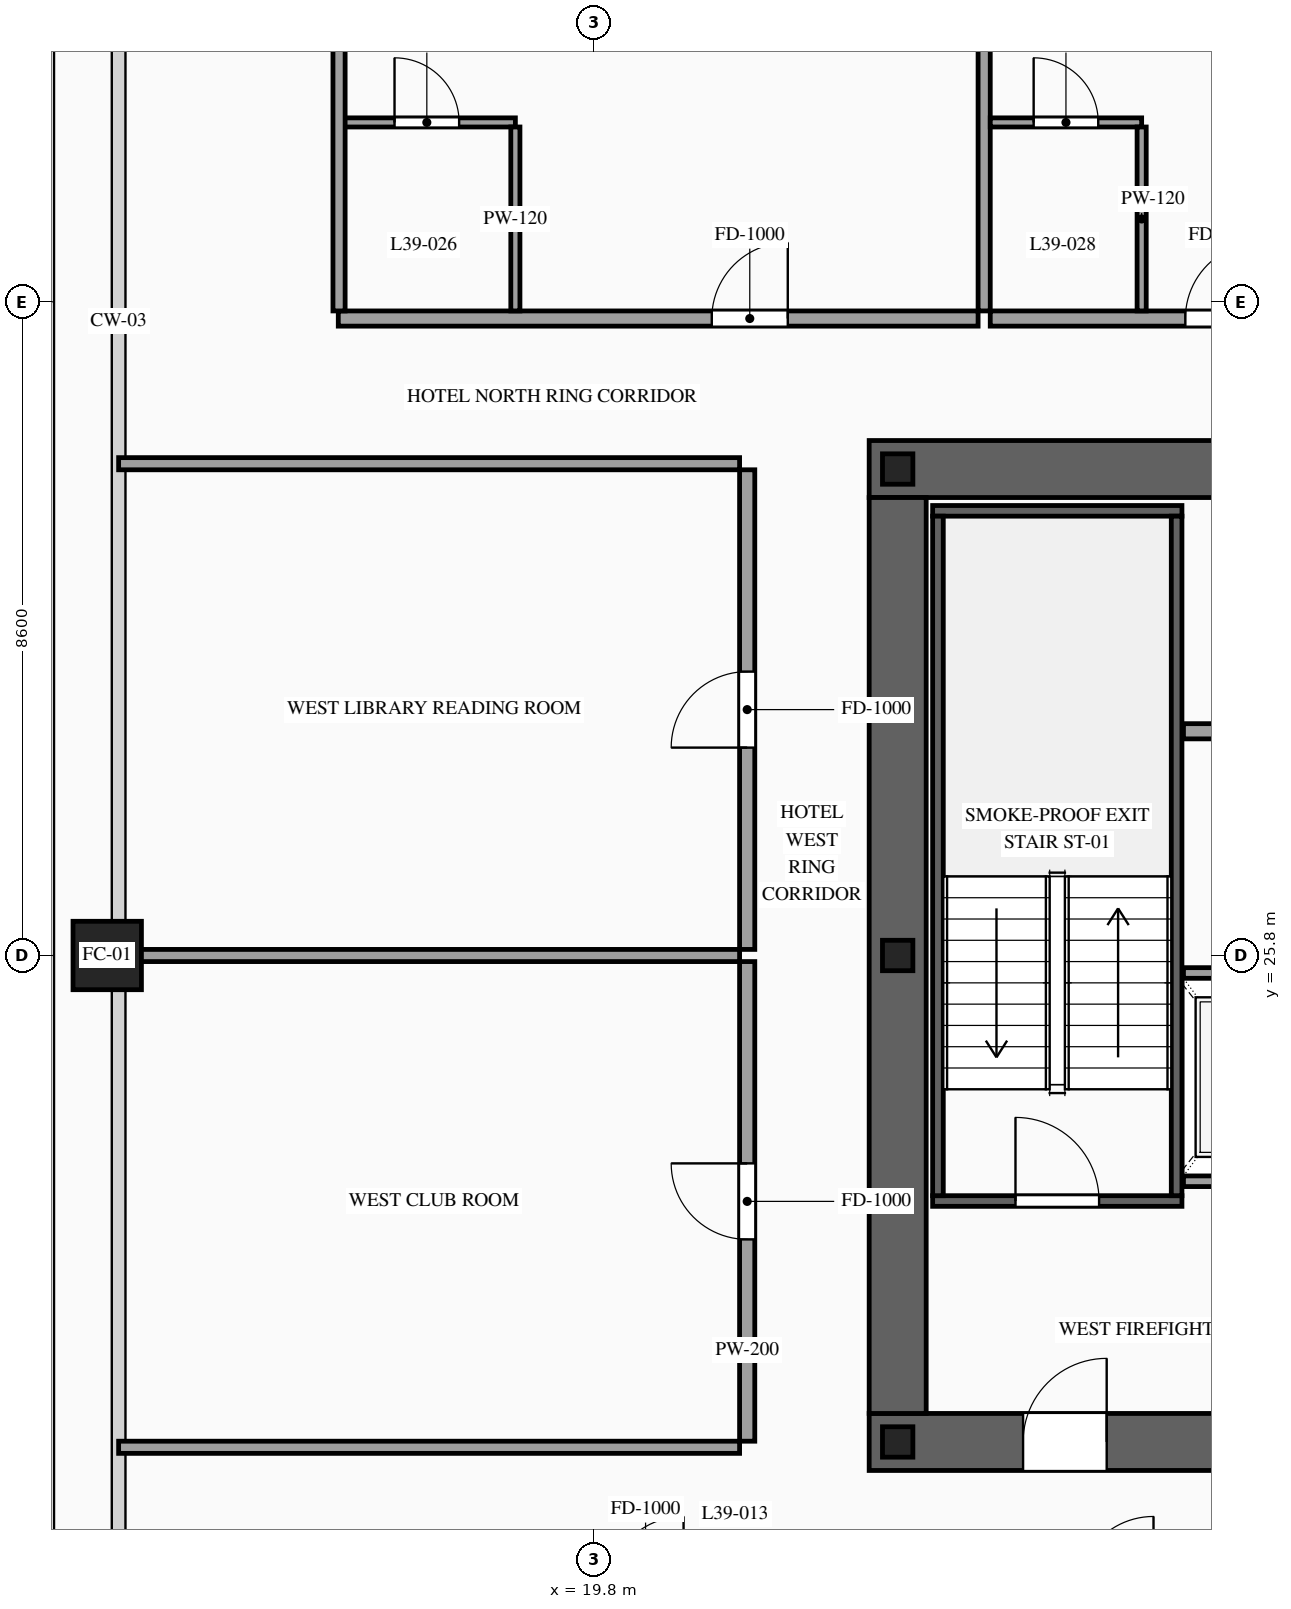
"""IFC4 building model, lengths in metres.
Left out: names, types, materials, properties, quantities, classifications, styles, units other than length and angle.
Written with IfcOpenShell. Run it as: python <this file> out.ifc"""

import sys

from ifc_helpers import new_model, si_unit, direction, frame, frame_2d, origin, origin_2d, place, context, subcontext, project, spatial, rectangle, hollow_rectangle, i_section, extrude, source, transform, mapped, element, fill, save


model = new_model("IFC4")
c1 = context("Model", 3, precision=1e-05, world=origin(), true_north=direction((0.0, 1.0)))
c2 = subcontext(c1, "Body", "Model", "MODEL_VIEW")
j1 = project(units=[si_unit("LENGTHUNIT", "METRE"), si_unit("PLANEANGLEUNIT", "RADIAN")], contexts=[c1])
p1 = place(None, origin())
s1 = spatial("IfcSite", under=j1, at=p1, CompositionType="ELEMENT")
p2 = place(p1, origin())
s2 = spatial("IfcBuilding", under=s1, at=p2, CompositionType="ELEMENT")
p3 = place(p2, frame((0.0, 0.0, 148.8)))
s3 = spatial("IfcBuildingStorey", under=s2, at=p3, CompositionType="ELEMENT", Elevation=148.8)
p4 = place(p3, frame((23.425, 19.4, 0.0), z_axis=(0.0, 0.0, 1.0), x_axis=(1.0, 0.0, 0.0)))
e1 = element("IfcWall", 1, at=p4, inside=s3, PredefinedType="SHEAR", context=c2, shape_type="SweptSolid", body=[
    extrude(rectangle(XDim=27.15, YDim=0.75, at=frame_2d((13.575, 0.0))), origin(), (0.0, 0.0, 1.0), 3.6),
])
p5 = place(p4, frame((2.025, 0.0, 0.0)))
e2 = element("IfcOpeningElement", 2, at=p5, cuts=e1, PredefinedType="OPENING", context=c2, shape_type="SweptSolid", body=[
    extrude(rectangle(XDim=1.1, YDim=2.2, at=frame_2d((0.55, 1.1))), frame((0.0, 0.39, 0.0), z_axis=(0.0, -1.0, 0.0), x_axis=(1.0, 0.0, 0.0)), (0.0, 0.0, 1.0), 0.78),
])
p6 = place(p4, frame((9.925, 0.0, 0.0)))
e3 = element("IfcOpeningElement", 3, at=p6, cuts=e1, PredefinedType="OPENING", context=c2, shape_type="SweptSolid", body=[
    extrude(rectangle(XDim=1.1, YDim=2.2, at=frame_2d((0.55, 1.1))), frame((0.0, 0.39, 0.0), z_axis=(0.0, -1.0, 0.0), x_axis=(1.0, 0.0, 0.0)), (0.0, 0.0, 1.0), 0.78),
])
p7 = place(p4, frame((23.125, 0.0, 0.0)))
e4 = element("IfcOpeningElement", 4, at=p7, cuts=e1, PredefinedType="OPENING", context=c2, shape_type="SweptSolid", body=[
    extrude(rectangle(XDim=1.1, YDim=2.2, at=frame_2d((0.55, 1.1))), frame((0.0, 0.39, 0.0), z_axis=(0.0, -1.0, 0.0), x_axis=(1.0, 0.0, 0.0)), (0.0, 0.0, 1.0), 0.78),
])
p8 = place(p4, frame((19.745, 0.0, 0.0)))
e5 = element("IfcOpeningElement", 5, at=p8, cuts=e1, PredefinedType="OPENING", context=c2, shape_type="SweptSolid", body=[
    extrude(rectangle(XDim=0.9, YDim=2.15, at=frame_2d((0.45, 1.075))), frame((0.0, 0.39, 0.0), z_axis=(0.0, -1.0, 0.0), x_axis=(1.0, 0.0, 0.0)), (0.0, 0.0, 1.0), 0.78),
])
p9 = place(p4, frame((18.305, 0.0, 0.0)))
e6 = element("IfcOpeningElement", 6, at=p9, cuts=e1, PredefinedType="OPENING", context=c2, shape_type="SweptSolid", body=[
    extrude(rectangle(XDim=0.9, YDim=2.15, at=frame_2d((0.45, 1.075))), frame((0.0, 0.39, 0.0), z_axis=(0.0, -1.0, 0.0), x_axis=(1.0, 0.0, 0.0)), (0.0, 0.0, 1.0), 0.78),
])
p10 = place(p3, frame((23.425, 32.2, 0.0), z_axis=(0.0, 0.0, 1.0), x_axis=(1.0, 0.0, 0.0)))
e7 = element("IfcWall", 7, at=p10, inside=s3, PredefinedType="SHEAR", context=c2, shape_type="SweptSolid", body=[
    extrude(rectangle(XDim=27.15, YDim=0.75, at=frame_2d((13.575, 0.0))), origin(), (0.0, 0.0, 1.0), 3.6),
])
p11 = place(p10, frame((4.645, 0.0, 0.0)))
e8 = element("IfcOpeningElement", 8, at=p11, cuts=e7, PredefinedType="OPENING", context=c2, shape_type="SweptSolid", body=[
    extrude(rectangle(XDim=0.9, YDim=2.15, at=frame_2d((0.45, 1.075))), frame((0.0, 0.39, 0.0), z_axis=(0.0, -1.0, 0.0), x_axis=(1.0, 0.0, 0.0)), (0.0, 0.0, 1.0), 0.78),
])
p12 = place(p10, frame((9.925, 0.0, 0.0)))
e9 = element("IfcOpeningElement", 9, at=p12, cuts=e7, PredefinedType="OPENING", context=c2, shape_type="SweptSolid", body=[
    extrude(rectangle(XDim=1.1, YDim=2.2, at=frame_2d((0.55, 1.1))), frame((0.0, 0.39, 0.0), z_axis=(0.0, -1.0, 0.0), x_axis=(1.0, 0.0, 0.0)), (0.0, 0.0, 1.0), 0.78),
])
p13 = place(p10, frame((15.775, 0.0, 0.0)))
e10 = element("IfcOpeningElement", 10, at=p13, cuts=e7, PredefinedType="OPENING", context=c2, shape_type="SweptSolid", body=[
    extrude(rectangle(XDim=1.1, YDim=2.2, at=frame_2d((0.55, 1.1))), frame((0.0, 0.39, 0.0), z_axis=(0.0, -1.0, 0.0), x_axis=(1.0, 0.0, 0.0)), (0.0, 0.0, 1.0), 0.78),
])
p14 = place(p10, frame((19.745, 0.0, 0.0)))
e11 = element("IfcOpeningElement", 11, at=p14, cuts=e7, PredefinedType="OPENING", context=c2, shape_type="SweptSolid", body=[
    extrude(rectangle(XDim=0.9, YDim=2.15, at=frame_2d((0.45, 1.075))), frame((0.0, 0.39, 0.0), z_axis=(0.0, -1.0, 0.0), x_axis=(1.0, 0.0, 0.0)), (0.0, 0.0, 1.0), 0.78),
])
m1 = source(origin(), c2, "Body", "SweptSolid", [
    extrude(rectangle(XDim=12.05, YDim=0.75, at=frame_2d((6.025, 0.0))), origin(), (0.0, 0.0, 1.0), 3.6),
])
p15 = place(p3, frame((23.8, 19.775, 0.0), z_axis=(0.0, 0.0, 1.0), x_axis=(0.0, 1.0, 0.0)))
e12 = element("IfcWall", 12, at=p15, inside=s3, PredefinedType="SHEAR", context=c2, shape_type="MappedRepresentation", body=[
    mapped(m1, transform((0.0, 0.0, 0.0), scale=1.0)),
])
m2 = source(origin(), c2, "Body", "SweptSolid", [
    extrude(i_section(OverallWidth=0.4, OverallDepth=0.4, WebThickness=0.013, FlangeThickness=0.021, at=origin_2d()), origin(), (0.0, 0.0, 1.0), 3.6),
])
for number, where, z_axis, x_axis in (
    (13, (23.8, 19.4, 0.0), (0.0, 0.0, 1.0), (1.0, 0.0, 0.0)),
    (14, (23.8, 25.8, 0.0), (0.0, 0.0, 1.0), (1.0, 0.0, 0.0)),
    (15, (23.8, 32.2, 0.0), (0.0, 0.0, 1.0), (1.0, 0.0, 0.0)),
):
    element("IfcColumn", number, at=place(p3, frame(where, z_axis=z_axis, x_axis=x_axis)), inside=s3, PredefinedType="COLUMN", context=c2, shape_type="MappedRepresentation", body=[
        mapped(m2, transform((0.0, 0.0, 0.0), scale=1.0)),
    ])
m3 = source(origin(), c2, "Body", "SweptSolid", [
    extrude(hollow_rectangle(XDim=0.9, YDim=0.9, WallThickness=0.042, at=origin_2d()), origin(), (0.0, 0.0, 1.0), 3.6),
])
p16 = place(p3, frame((13.4, 25.8, 0.0), z_axis=(0.0, 0.0, 1.0), x_axis=(1.0, 0.0, 0.0)))
e16 = element("IfcColumn", 16, at=p16, inside=s3, PredefinedType="COLUMN", context=c2, shape_type="MappedRepresentation", body=[
    mapped(m3, transform((0.0, 0.0, 0.0), scale=1.0)),
])
p17 = place(p3, frame((27.56, 22.83, 0.0), z_axis=(0.0, 0.0, 1.0), x_axis=(1.0, 0.0, 0.0)))
e17 = element("IfcWall", 17, at=p17, inside=s3, PredefinedType="SOLIDWALL", context=c2, shape_type="SweptSolid", body=[
    extrude(rectangle(XDim=1.92, YDim=0.14, at=frame_2d((0.96, 0.0))), origin(), (0.0, 0.0, 1.0), 3.38),
])
p18 = place(p17, frame((0.41, 0.0, 0.0)))
e18 = element("IfcOpeningElement", 18, at=p18, cuts=e17, PredefinedType="OPENING", context=c2, shape_type="SweptSolid", body=[
    extrude(rectangle(XDim=1.1, YDim=2.2, at=frame_2d((0.55, 1.1))), frame((0.0, 0.085, 0.0), z_axis=(0.0, -1.0, 0.0), x_axis=(1.0, 0.0, 0.0)), (0.0, 0.0, 1.0), 0.17),
])
m4 = source(origin(), c2, "Body", "SweptSolid", [
    extrude(rectangle(XDim=1.92, YDim=0.14, at=frame_2d((0.96, 0.0))), origin(), (0.0, 0.0, 1.0), 3.38),
])
p19 = place(p3, frame((27.56, 25.57, 0.0), z_axis=(0.0, 0.0, 1.0), x_axis=(1.0, 0.0, 0.0)))
e19 = element("IfcWall", 19, at=p19, inside=s3, PredefinedType="SOLIDWALL", context=c2, shape_type="MappedRepresentation", body=[
    mapped(m4, transform((0.0, 0.0, 0.0), scale=1.0)),
])
p20 = place(p3, frame((24.26, 22.57, 0.0), z_axis=(0.0, 0.0, 1.0), x_axis=(1.0, 0.0, 0.0)))
e20 = element("IfcWall", 20, at=p20, inside=s3, PredefinedType="SOLIDWALL", context=c2, shape_type="SweptSolid", body=[
    extrude(rectangle(XDim=3.28, YDim=0.14, at=frame_2d((1.64, 0.0))), origin(), (0.0, 0.0, 1.0), 3.38),
])
p21 = place(p20, frame((1.09, 0.0, 0.0)))
e21 = element("IfcOpeningElement", 21, at=p21, cuts=e20, PredefinedType="OPENING", context=c2, shape_type="SweptSolid", body=[
    extrude(rectangle(XDim=1.1, YDim=2.2, at=frame_2d((0.55, 1.1))), frame((0.0, 0.085, 0.0), z_axis=(0.0, -1.0, 0.0), x_axis=(1.0, 0.0, 0.0)), (0.0, 0.0, 1.0), 0.17),
])
m5 = source(origin(), c2, "Body", "SweptSolid", [
    extrude(rectangle(XDim=3.28, YDim=0.14, at=frame_2d((1.64, 0.0))), origin(), (0.0, 0.0, 1.0), 3.38),
])
p22 = place(p3, frame((24.26, 31.65, 0.0), z_axis=(0.0, 0.0, 1.0), x_axis=(1.0, 0.0, 0.0)))
e22 = element("IfcWall", 22, at=p22, inside=s3, PredefinedType="SOLIDWALL", context=c2, shape_type="MappedRepresentation", body=[
    mapped(m5, transform((0.0, 0.0, 0.0), scale=1.0)),
])
m6 = source(origin(), c2, "Body", "SweptSolid", [
    extrude(rectangle(XDim=8.94, YDim=0.14, at=frame_2d((4.47, 0.0))), origin(), (0.0, 0.0, 1.0), 3.38),
])
for number, where, z_axis, x_axis in (
    (23, (24.33, 22.64, 0.0), (0.0, 0.0, 1.0), (0.0, 1.0, 0.0)),
    (24, (27.47, 22.64, 0.0), (0.0, 0.0, 1.0), (0.0, 1.0, 0.0)),
):
    element("IfcWall", number, at=place(p3, frame(where, z_axis=z_axis, x_axis=x_axis)), inside=s3, PredefinedType="SOLIDWALL", context=c2, shape_type="MappedRepresentation", body=[
        mapped(m6, transform((0.0, 0.0, 0.0), scale=1.0)),
    ])
p23 = place(p3, frame((27.56, 28.75, 0.0), z_axis=(0.0, 0.0, 1.0), x_axis=(1.0, 0.0, 0.0)))
e25 = element("IfcWall", 25, at=p23, inside=s3, PredefinedType="PARTITIONING", context=c2, shape_type="SweptSolid", body=[
    extrude(rectangle(XDim=1.92, YDim=0.2, at=frame_2d((0.96, 0.0))), origin(), (0.0, 0.0, 1.0), 3.38),
])
p24 = place(p23, frame((0.51, 0.0, 0.0)))
e26 = element("IfcOpeningElement", 26, at=p24, cuts=e25, PredefinedType="OPENING", context=c2, shape_type="SweptSolid", body=[
    extrude(rectangle(XDim=0.9, YDim=2.15, at=frame_2d((0.45, 1.075))), frame((0.0, 0.115, 0.0), z_axis=(0.0, -1.0, 0.0), x_axis=(1.0, 0.0, 0.0)), (0.0, 0.0, 1.0), 0.23),
])
p25 = place(p3, frame((16.44, 34.18, 0.0), z_axis=(0.0, 0.0, 1.0), x_axis=(1.0, 0.0, 0.0)))
e27 = element("IfcWall", 27, at=p25, inside=s3, PredefinedType="PARTITIONING", context=c2, shape_type="SweptSolid", body=[
    extrude(rectangle(XDim=8.418, YDim=0.2, at=frame_2d((4.209, 0.0))), origin(), (0.0, 0.0, 1.0), 3.38),
])
p26 = place(p25, frame((4.914, 0.0, 0.0)))
e28 = element("IfcOpeningElement", 28, at=p26, cuts=e27, PredefinedType="OPENING", context=c2, shape_type="SweptSolid", body=[
    extrude(rectangle(XDim=1.0, YDim=2.2, at=frame_2d((0.5, 1.1))), frame((0.0, 0.115, 0.0), z_axis=(0.0, -1.0, 0.0), x_axis=(1.0, 0.0, 0.0)), (0.0, 0.0, 1.0), 0.23),
])
m7 = source(origin(), c2, "Body", "SweptSolid", [
    extrude(rectangle(XDim=14.97, YDim=0.16, at=frame_2d((7.485, 0.0))), origin(), (0.0, 0.0, 1.0), 3.38),
])
p27 = place(p3, frame((24.938, 34.28, 0.0), z_axis=(0.0, 0.0, 1.0), x_axis=(0.0, 1.0, 0.0)))
e29 = element("IfcWall", 29, at=p27, inside=s3, PredefinedType="PARTITIONING", context=c2, shape_type="MappedRepresentation", body=[
    mapped(m7, transform((0.0, 0.0, 0.0), scale=1.0)),
])
p28 = place(p3, frame((16.44, 36.76, 0.0), z_axis=(0.0, 0.0, 1.0), x_axis=(1.0, 0.0, 0.0)))
e30 = element("IfcWall", 30, at=p28, inside=s3, PredefinedType="PARTITIONING", context=c2, shape_type="SweptSolid", body=[
    extrude(rectangle(XDim=2.33, YDim=0.12, at=frame_2d((1.165, 0.0))), origin(), (0.0, 0.0, 1.0), 3.38),
])
p29 = place(p28, frame((0.74, 0.0, 0.0)))
e31 = element("IfcOpeningElement", 31, at=p29, cuts=e30, PredefinedType="OPENING", context=c2, shape_type="SweptSolid", body=[
    extrude(rectangle(XDim=0.85, YDim=2.1, at=frame_2d((0.425, 1.05))), frame((0.0, 0.075, 0.0), z_axis=(0.0, -1.0, 0.0), x_axis=(1.0, 0.0, 0.0)), (0.0, 0.0, 1.0), 0.15),
])
m8 = source(origin(), c2, "Body", "SweptSolid", [
    extrude(rectangle(XDim=2.42, YDim=0.12, at=frame_2d((1.21, 0.0))), origin(), (0.0, 0.0, 1.0), 3.38),
])
p30 = place(p3, frame((18.77, 34.28, 0.0), z_axis=(0.0, 0.0, 1.0), x_axis=(0.0, 1.0, 0.0)))
e32 = element("IfcWall", 32, at=p30, inside=s3, PredefinedType="PARTITIONING", context=c2, shape_type="MappedRepresentation", body=[
    mapped(m8, transform((0.0, 0.0, 0.0), scale=1.0)),
])
p31 = place(p3, frame((25.018, 34.18, 0.0), z_axis=(0.0, 0.0, 1.0), x_axis=(1.0, 0.0, 0.0)))
e33 = element("IfcWall", 33, at=p31, inside=s3, PredefinedType="PARTITIONING", context=c2, shape_type="SweptSolid", body=[
    extrude(rectangle(XDim=4.062, YDim=0.2, at=frame_2d((2.031, 0.0))), origin(), (0.0, 0.0, 1.0), 3.38),
])
p32 = place(p31, frame((2.567, 0.0, 0.0)))
e34 = element("IfcOpeningElement", 34, at=p32, cuts=e33, PredefinedType="OPENING", context=c2, shape_type="SweptSolid", body=[
    extrude(rectangle(XDim=1.0, YDim=2.2, at=frame_2d((0.5, 1.1))), frame((0.0, 0.115, 0.0), z_axis=(0.0, -1.0, 0.0), x_axis=(1.0, 0.0, 0.0)), (0.0, 0.0, 1.0), 0.23),
])
p33 = place(p3, frame((25.018, 36.76, 0.0), z_axis=(0.0, 0.0, 1.0), x_axis=(1.0, 0.0, 0.0)))
e35 = element("IfcWall", 35, at=p33, inside=s3, PredefinedType="PARTITIONING", context=c2, shape_type="SweptSolid", body=[
    extrude(rectangle(XDim=1.992, YDim=0.12, at=frame_2d((0.996, 0.0))), origin(), (0.0, 0.0, 1.0), 3.38),
])
p34 = place(p33, frame((0.571, 0.0, 0.0)))
e36 = element("IfcOpeningElement", 36, at=p34, cuts=e35, PredefinedType="OPENING", context=c2, shape_type="SweptSolid", body=[
    extrude(rectangle(XDim=0.85, YDim=2.1, at=frame_2d((0.425, 1.05))), frame((0.0, 0.075, 0.0), z_axis=(0.0, -1.0, 0.0), x_axis=(1.0, 0.0, 0.0)), (0.0, 0.0, 1.0), 0.15),
])
p35 = place(p3, frame((27.01, 34.28, 0.0), z_axis=(0.0, 0.0, 1.0), x_axis=(0.0, 1.0, 0.0)))
e37 = element("IfcWall", 37, at=p35, inside=s3, PredefinedType="PARTITIONING", context=c2, shape_type="MappedRepresentation", body=[
    mapped(m8, transform((0.0, 0.0, 0.0), scale=1.0)),
])
m9 = source(origin(), c2, "Body", "SweptSolid", [
    extrude(rectangle(XDim=14.82, YDim=0.16, at=frame_2d((7.41, 0.0))), origin(), (0.0, 0.0, 1.0), 3.38),
])
p36 = place(p3, frame((16.45, 34.28, 0.0), z_axis=(0.0, 0.0, 1.0), x_axis=(0.0, 1.0, 0.0)))
e38 = element("IfcWall", 38, at=p36, inside=s3, PredefinedType="PARTITIONING", context=c2, shape_type="MappedRepresentation", body=[
    mapped(m9, transform((0.0, 0.0, 0.0), scale=1.0)),
])
p37 = place(p3, frame((21.82, 19.41, 0.0), z_axis=(0.0, 0.0, 1.0), x_axis=(0.0, 1.0, 0.0)))
e39 = element("IfcWall", 39, at=p37, inside=s3, PredefinedType="PARTITIONING", context=c2, shape_type="SweptSolid", body=[
    extrude(rectangle(XDim=6.31, YDim=0.2, at=frame_2d((3.155, 0.0))), origin(), (0.0, 0.0, 1.0), 3.38),
])
p38 = place(p37, frame((2.655, 0.0, 0.0)))
e40 = element("IfcOpeningElement", 40, at=p38, cuts=e39, PredefinedType="OPENING", context=c2, shape_type="SweptSolid", body=[
    extrude(rectangle(XDim=1.0, YDim=2.2, at=frame_2d((0.5, 1.1))), frame((0.0, 0.115, 0.0), z_axis=(0.0, -1.0, 0.0), x_axis=(1.0, 0.0, 0.0)), (0.0, 0.0, 1.0), 0.23),
])
m10 = source(origin(), c2, "Body", "SweptSolid", [
    extrude(rectangle(XDim=8.17, YDim=0.16, at=frame_2d((4.085, 0.0))), origin(), (0.0, 0.0, 1.0), 2.675),
])
p39 = place(p3, frame((13.55, 25.8, 0.0), z_axis=(0.0, 0.0, 1.0), x_axis=(1.0, 0.0, 0.0)))
e41 = element("IfcWall", 41, at=p39, inside=s3, PredefinedType="PARTITIONING", context=c2, shape_type="MappedRepresentation", body=[
    mapped(m10, transform((0.0, 0.0, 0.0), scale=1.0)),
])
m11 = source(origin(), c2, "Body", "SweptSolid", [
    extrude(rectangle(XDim=8.17, YDim=0.16, at=frame_2d((4.085, 0.0))), origin(), (0.0, 0.0, 1.0), 2.875),
])
p40 = place(p3, frame((13.55, 19.33, 0.0), z_axis=(0.0, 0.0, 1.0), x_axis=(1.0, 0.0, 0.0)))
e42 = element("IfcWall", 42, at=p40, inside=s3, PredefinedType="PARTITIONING", context=c2, shape_type="MappedRepresentation", body=[
    mapped(m11, transform((0.0, 0.0, 0.0), scale=1.0)),
])
p41 = place(p3, frame((21.82, 25.88, 0.0), z_axis=(0.0, 0.0, 1.0), x_axis=(0.0, 1.0, 0.0)))
e43 = element("IfcWall", 43, at=p41, inside=s3, PredefinedType="PARTITIONING", context=c2, shape_type="SweptSolid", body=[
    extrude(rectangle(XDim=6.31, YDim=0.2, at=frame_2d((3.155, 0.0))), origin(), (0.0, 0.0, 1.0), 3.38),
])
p42 = place(p41, frame((2.655, 0.0, 0.0)))
e44 = element("IfcOpeningElement", 44, at=p42, cuts=e43, PredefinedType="OPENING", context=c2, shape_type="SweptSolid", body=[
    extrude(rectangle(XDim=1.0, YDim=2.2, at=frame_2d((0.5, 1.1))), frame((0.0, 0.115, 0.0), z_axis=(0.0, -1.0, 0.0), x_axis=(1.0, 0.0, 0.0)), (0.0, 0.0, 1.0), 0.23),
])
p43 = place(p3, frame((13.55, 32.27, 0.0), z_axis=(0.0, 0.0, 1.0), x_axis=(1.0, 0.0, 0.0)))
e45 = element("IfcWall", 45, at=p43, inside=s3, PredefinedType="PARTITIONING", context=c2, shape_type="MappedRepresentation", body=[
    mapped(m11, transform((0.0, 0.0, 0.0), scale=1.0)),
])
m12 = source(origin(), c2, "Body", "SweptSolid", [
    extrude(rectangle(XDim=1.1, YDim=2.2, at=frame_2d((0.55, 1.1))), frame((0.0, 0.025, 0.0), z_axis=(0.0, -1.0, 0.0), x_axis=(1.0, 0.0, 0.0)), (0.0, 0.0, 1.0), 0.05),
])
p44 = place(p21, origin())
e46 = element("IfcDoor", 46, at=p44, inside=s3, OperationType="SINGLE_SWING_LEFT", PredefinedType="DOOR", context=c2, shape_type="MappedRepresentation", body=[
    mapped(m12, transform((0.0, 0.0, 0.0), scale=1.0)),
])
fill(e21, e46)
p45 = place(p5, origin())
e47 = element("IfcDoor", 47, at=p45, inside=s3, OperationType="SINGLE_SWING_RIGHT", PredefinedType="DOOR", context=c2, shape_type="MappedRepresentation", body=[
    mapped(m12, transform((0.0, 0.0, 0.0), scale=1.0)),
])
fill(e2, e47)
m13 = source(origin(), c2, "Body", "SweptSolid", [
    extrude(rectangle(XDim=1.0, YDim=2.2, at=frame_2d((0.5, 1.1))), frame((0.0, 0.025, 0.0), z_axis=(0.0, -1.0, 0.0), x_axis=(1.0, 0.0, 0.0)), (0.0, 0.0, 1.0), 0.05),
])
p46 = place(p26, origin())
e48 = element("IfcDoor", 48, at=p46, inside=s3, OperationType="SINGLE_SWING_RIGHT", PredefinedType="DOOR", context=c2, shape_type="MappedRepresentation", body=[
    mapped(m13, transform((0.0, 0.0, 0.0), scale=1.0)),
])
fill(e28, e48)
m14 = source(origin(), c2, "Body", "SweptSolid", [
    extrude(rectangle(XDim=0.85, YDim=2.1, at=frame_2d((0.425, 1.05))), frame((0.0, 0.025, 0.0), z_axis=(0.0, -1.0, 0.0), x_axis=(1.0, 0.0, 0.0)), (0.0, 0.0, 1.0), 0.05),
])
p47 = place(p29, origin())
e49 = element("IfcDoor", 49, at=p47, inside=s3, OperationType="SINGLE_SWING_LEFT", PredefinedType="DOOR", context=c2, shape_type="MappedRepresentation", body=[
    mapped(m14, transform((0.0, 0.0, 0.0), scale=1.0)),
])
fill(e31, e49)
p48 = place(p32, origin())
e50 = element("IfcDoor", 50, at=p48, inside=s3, OperationType="SINGLE_SWING_RIGHT", PredefinedType="DOOR", context=c2, shape_type="MappedRepresentation", body=[
    mapped(m13, transform((0.0, 0.0, 0.0), scale=1.0)),
])
fill(e34, e50)
p49 = place(p34, origin())
e51 = element("IfcDoor", 51, at=p49, inside=s3, OperationType="SINGLE_SWING_LEFT", PredefinedType="DOOR", context=c2, shape_type="MappedRepresentation", body=[
    mapped(m14, transform((0.0, 0.0, 0.0), scale=1.0)),
])
fill(e36, e51)
p50 = place(p38, origin())
e52 = element("IfcDoor", 52, at=p50, inside=s3, OperationType="SINGLE_SWING_RIGHT", PredefinedType="DOOR", context=c2, shape_type="MappedRepresentation", body=[
    mapped(m13, transform((0.0, 0.0, 0.0), scale=1.0)),
])
fill(e40, e52)
p51 = place(p42, origin())
e53 = element("IfcDoor", 53, at=p51, inside=s3, OperationType="SINGLE_SWING_LEFT", PredefinedType="DOOR", context=c2, shape_type="MappedRepresentation", body=[
    mapped(m13, transform((0.0, 0.0, 0.0), scale=1.0)),
])
fill(e44, e53)
save(model, sys.argv[1])
